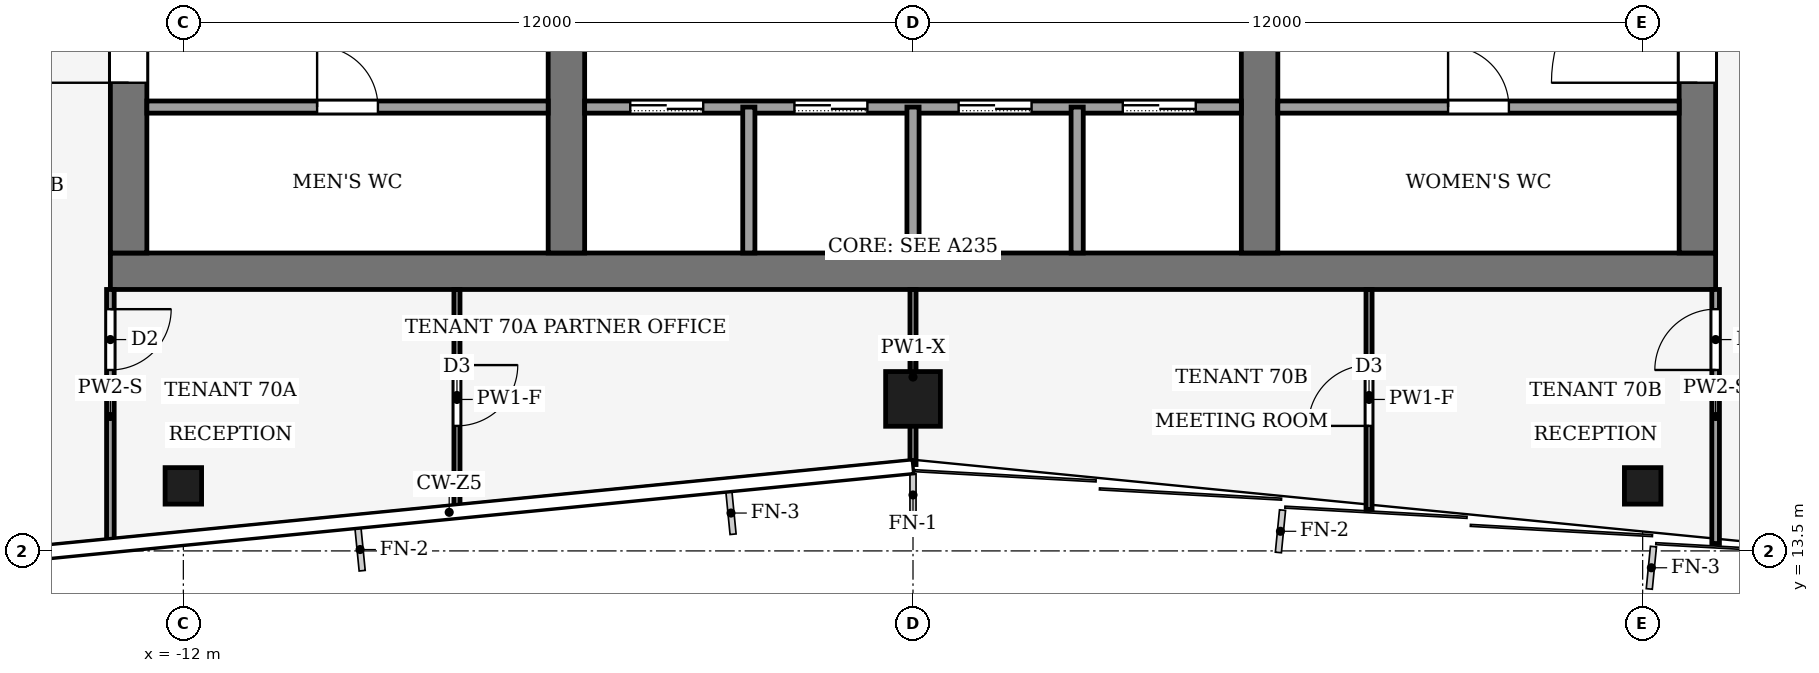
"""IFC4 building model, lengths in metres.
Left out: names, types, materials, properties, quantities, classifications, styles, units other than length and angle.
Written with IfcOpenShell. Run it as: python <this file> out.ifc"""

import sys

from ifc_helpers import new_model, si_unit, direction, frame, frame_2d, origin, origin_2d, place, context, subcontext, project, spatial, rectangle, hollow_rectangle, extrude, element, fill, save


model = new_model("IFC4")
c1 = context("Model", 3, precision=1e-05, world=origin(), true_north=direction((0.0, 1.0)))
c2 = subcontext(c1, "Body", "Model", "MODEL_VIEW")
j1 = project(units=[si_unit("LENGTHUNIT", "METRE"), si_unit("PLANEANGLEUNIT", "RADIAN")], contexts=[c1])
p1 = place(None, origin())
s1 = spatial("IfcSite", under=j1, at=p1, CompositionType="ELEMENT")
p2 = place(p1, origin())
s2 = spatial("IfcBuilding", under=s1, at=p2, CompositionType="ELEMENT")
p3 = place(p2, frame((0.0, 0.0, 306.0)))
s3 = spatial("IfcBuildingStorey", under=s2, at=p3, CompositionType="ELEMENT", Elevation=306.0)
p4 = place(p3, frame((-13.2, 18.1, -0.13), z_axis=(0.0, 0.0, 1.0), x_axis=(1.0, 0.0, 0.0)))
e1 = element("IfcWall", 1, at=p4, inside=s3, PredefinedType="SHEAR", context=c2, shape_type="SweptSolid", body=[
    extrude(rectangle(XDim=26.4, YDim=0.6, at=frame_2d((13.2, 0.0))), origin(), (0.0, 0.0, 1.0), 4.0),
])
p5 = place(p3, frame((-12.9, 18.4, -0.13), z_axis=(0.0, 0.0, 1.0), x_axis=(0.0, 1.0, 0.0)))
e2 = element("IfcWall", 2, at=p5, inside=s3, PredefinedType="SHEAR", context=c2, shape_type="SweptSolid", body=[
    extrude(rectangle(XDim=19.2, YDim=0.6, at=frame_2d((9.6, 0.0))), origin(), (0.0, 0.0, 1.0), 4.0),
])
p6 = place(p5, frame((2.8, 0.0, 0.13)))
e3 = element("IfcOpeningElement", 3, at=p6, cuts=e2, PredefinedType="OPENING", context=c2, shape_type="SweptSolid", body=[
    extrude(rectangle(XDim=2.4, YDim=2.4, at=frame_2d((1.2, 1.2))), frame((0.0, 0.31, 0.0), z_axis=(0.0, -1.0, 0.0), x_axis=(1.0, 0.0, 0.0)), (0.0, 0.0, 1.0), 0.62),
])
p7 = place(p5, frame((13.4, 0.0, 0.13)))
e4 = element("IfcOpeningElement", 4, at=p7, cuts=e2, PredefinedType="OPENING", context=c2, shape_type="SweptSolid", body=[
    extrude(rectangle(XDim=1.4, YDim=2.2, at=frame_2d((0.7, 1.1))), frame((0.0, 0.31, 0.0), z_axis=(0.0, -1.0, 0.0), x_axis=(1.0, 0.0, 0.0)), (0.0, 0.0, 1.0), 0.62),
])
p8 = place(p3, frame((12.9, 18.4, -0.13), z_axis=(0.0, 0.0, 1.0), x_axis=(0.0, 1.0, 0.0)))
e5 = element("IfcWall", 5, at=p8, inside=s3, PredefinedType="SHEAR", context=c2, shape_type="SweptSolid", body=[
    extrude(rectangle(XDim=19.2, YDim=0.6, at=frame_2d((9.6, 0.0))), origin(), (0.0, 0.0, 1.0), 4.0),
])
p9 = place(p8, frame((2.8, 0.0, 0.13)))
e6 = element("IfcOpeningElement", 6, at=p9, cuts=e5, PredefinedType="OPENING", context=c2, shape_type="SweptSolid", body=[
    extrude(rectangle(XDim=2.4, YDim=2.4, at=frame_2d((1.2, 1.2))), frame((0.0, 0.31, 0.0), z_axis=(0.0, -1.0, 0.0), x_axis=(1.0, 0.0, 0.0)), (0.0, 0.0, 1.0), 0.62),
])
p10 = place(p8, frame((13.3, 0.0, 0.13)))
e7 = element("IfcOpeningElement", 7, at=p10, cuts=e5, PredefinedType="OPENING", context=c2, shape_type="SweptSolid", body=[
    extrude(rectangle(XDim=2.4, YDim=2.4, at=frame_2d((1.2, 1.2))), frame((0.0, 0.31, 0.0), z_axis=(0.0, -1.0, 0.0), x_axis=(1.0, 0.0, 0.0)), (0.0, 0.0, 1.0), 0.62),
])
p11 = place(p3, frame((-5.7, 18.4, -0.13), z_axis=(0.0, 0.0, 1.0), x_axis=(0.0, 1.0, 0.0)))
e8 = element("IfcWall", 8, at=p11, inside=s3, PredefinedType="SHEAR", context=c2, shape_type="SweptSolid", body=[
    extrude(rectangle(XDim=19.2, YDim=0.6, at=frame_2d((9.6, 0.0))), origin(), (0.0, 0.0, 1.0), 4.0),
])
p12 = place(p11, frame((8.35, 0.0, 0.13)))
e9 = element("IfcOpeningElement", 9, at=p12, cuts=e8, PredefinedType="OPENING", context=c2, shape_type="SweptSolid", body=[
    extrude(rectangle(XDim=0.9, YDim=2.1, at=frame_2d((0.45, 1.05))), frame((0.0, 0.31, 0.0), z_axis=(0.0, -1.0, 0.0), x_axis=(1.0, 0.0, 0.0)), (0.0, 0.0, 1.0), 0.62),
])
p13 = place(p3, frame((5.7, 18.4, -0.13), z_axis=(0.0, 0.0, 1.0), x_axis=(0.0, 1.0, 0.0)))
e10 = element("IfcWall", 10, at=p13, inside=s3, PredefinedType="SHEAR", context=c2, shape_type="SweptSolid", body=[
    extrude(rectangle(XDim=19.2, YDim=0.6, at=frame_2d((9.6, 0.0))), origin(), (0.0, 0.0, 1.0), 4.0),
])
p14 = place(p13, frame((13.3, 0.0, 0.13)))
e11 = element("IfcOpeningElement", 11, at=p14, cuts=e10, PredefinedType="OPENING", context=c2, shape_type="SweptSolid", body=[
    extrude(rectangle(XDim=2.4, YDim=2.4, at=frame_2d((1.2, 1.2))), frame((0.0, 0.31, 0.0), z_axis=(0.0, -1.0, 0.0), x_axis=(1.0, 0.0, 0.0)), (0.0, 0.0, 1.0), 0.62),
])
p15 = place(p3, frame((0.0, 16.0, 0.0), z_axis=(0.0, 0.0, 1.0), x_axis=(1.0, 0.0, 0.0)))
e12 = element("IfcColumn", 12, at=p15, inside=s3, PredefinedType="COLUMN", context=c2, shape_type="SweptSolid", body=[
    extrude(hollow_rectangle(XDim=0.9, YDim=0.9, WallThickness=0.04, at=origin_2d()), origin(), (0.0, 0.0, 1.0), 4.0),
])
for number, where, z_axis, x_axis in (
    (13, (-12.0, 14.57, 0.0), (0.0, 0.0, 1.0), (1.0, 0.0, 0.0)),
    (14, (12.0, 14.57, 0.0), (0.0, 0.0, 1.0), (1.0, 0.0, 0.0)),
):
    element("IfcColumn", number, at=place(p3, frame(where, z_axis=z_axis, x_axis=x_axis)), inside=s3, PredefinedType="COLUMN", context=c2, shape_type="SweptSolid", body=[
        extrude(hollow_rectangle(XDim=0.6, YDim=0.6, WallThickness=0.025, at=origin_2d()), origin(), (0.0, 0.0, 1.0), 4.0),
    ])
p16 = place(p3, frame((-12.6, 20.8, 0.0), z_axis=(0.0, 0.0, 1.0), x_axis=(1.0, 0.0, 0.0)))
e15 = element("IfcWall", 15, at=p16, inside=s3, PredefinedType="PARTITIONING", context=c2, shape_type="SweptSolid", body=[
    extrude(rectangle(XDim=6.6, YDim=0.2, at=frame_2d((3.3, 0.0))), origin(), (0.0, 0.0, 1.0), 3.87),
])
p17 = place(p16, frame((2.8, 0.0, 0.0)))
e16 = element("IfcOpeningElement", 16, at=p17, cuts=e15, PredefinedType="OPENING", context=c2, shape_type="SweptSolid", body=[
    extrude(rectangle(XDim=1.0, YDim=2.1, at=frame_2d((0.5, 1.05))), frame((0.0, 0.11, 0.0), z_axis=(0.0, -1.0, 0.0), x_axis=(1.0, 0.0, 0.0)), (0.0, 0.0, 1.0), 0.22),
])
p18 = place(p3, frame((-5.4, 20.8, 0.0), z_axis=(0.0, 0.0, 1.0), x_axis=(1.0, 0.0, 0.0)))
e17 = element("IfcWall", 17, at=p18, inside=s3, PredefinedType="PARTITIONING", context=c2, shape_type="SweptSolid", body=[
    extrude(rectangle(XDim=10.8, YDim=0.2, at=frame_2d((5.4, 0.0))), origin(), (0.0, 0.0, 1.0), 3.87),
])
p19 = place(p18, frame((0.75, 0.0, 0.0)))
e18 = element("IfcOpeningElement", 18, at=p19, cuts=e17, PredefinedType="OPENING", context=c2, shape_type="SweptSolid", body=[
    extrude(rectangle(XDim=1.2, YDim=2.2, at=frame_2d((0.6, 1.1))), frame((0.0, 0.11, 0.0), z_axis=(0.0, -1.0, 0.0), x_axis=(1.0, 0.0, 0.0)), (0.0, 0.0, 1.0), 0.22),
])
p20 = place(p18, frame((3.45, 0.0, 0.0)))
e19 = element("IfcOpeningElement", 19, at=p20, cuts=e17, PredefinedType="OPENING", context=c2, shape_type="SweptSolid", body=[
    extrude(rectangle(XDim=1.2, YDim=2.2, at=frame_2d((0.6, 1.1))), frame((0.0, 0.11, 0.0), z_axis=(0.0, -1.0, 0.0), x_axis=(1.0, 0.0, 0.0)), (0.0, 0.0, 1.0), 0.22),
])
p21 = place(p18, frame((6.15, 0.0, 0.0)))
e20 = element("IfcOpeningElement", 20, at=p21, cuts=e17, PredefinedType="OPENING", context=c2, shape_type="SweptSolid", body=[
    extrude(rectangle(XDim=1.2, YDim=2.2, at=frame_2d((0.6, 1.1))), frame((0.0, 0.11, 0.0), z_axis=(0.0, -1.0, 0.0), x_axis=(1.0, 0.0, 0.0)), (0.0, 0.0, 1.0), 0.22),
])
p22 = place(p18, frame((8.85, 0.0, 0.0)))
e21 = element("IfcOpeningElement", 21, at=p22, cuts=e17, PredefinedType="OPENING", context=c2, shape_type="SweptSolid", body=[
    extrude(rectangle(XDim=1.2, YDim=2.2, at=frame_2d((0.6, 1.1))), frame((0.0, 0.11, 0.0), z_axis=(0.0, -1.0, 0.0), x_axis=(1.0, 0.0, 0.0)), (0.0, 0.0, 1.0), 0.22),
])
p23 = place(p3, frame((6.0, 20.8, 0.0), z_axis=(0.0, 0.0, 1.0), x_axis=(1.0, 0.0, 0.0)))
e22 = element("IfcWall", 22, at=p23, inside=s3, PredefinedType="PARTITIONING", context=c2, shape_type="SweptSolid", body=[
    extrude(rectangle(XDim=6.6, YDim=0.2, at=frame_2d((3.3, 0.0))), origin(), (0.0, 0.0, 1.0), 3.87),
])
p24 = place(p23, frame((2.8, 0.0, 0.0)))
e23 = element("IfcOpeningElement", 23, at=p24, cuts=e22, PredefinedType="OPENING", context=c2, shape_type="SweptSolid", body=[
    extrude(rectangle(XDim=1.0, YDim=2.1, at=frame_2d((0.5, 1.05))), frame((0.0, 0.11, 0.0), z_axis=(0.0, -1.0, 0.0), x_axis=(1.0, 0.0, 0.0)), (0.0, 0.0, 1.0), 0.22),
])
for number, where, z_axis, x_axis in (
    (24, (-2.7, 18.4, 0.0), (0.0, 0.0, 1.0), (0.0, 1.0, 0.0)),
    (25, (0.0, 18.4, 0.0), (0.0, 0.0, 1.0), (0.0, 1.0, 0.0)),
    (26, (2.7, 18.4, 0.0), (0.0, 0.0, 1.0), (0.0, 1.0, 0.0)),
):
    element("IfcWall", number, at=place(p3, frame(where, z_axis=z_axis, x_axis=x_axis)), inside=s3, PredefinedType="PARTITIONING", context=c2, shape_type="SweptSolid", body=[
        extrude(rectangle(XDim=2.4, YDim=0.2, at=frame_2d((1.2, 0.0))), origin(), (0.0, 0.0, 1.0), 3.87),
    ])
p25 = place(p3, frame((-13.2, 17.8, 0.0), z_axis=(0.0, 0.0, 1.0), x_axis=(0.0, -1.0, 0.0)))
e27 = element("IfcWall", 27, at=p25, inside=s3, PredefinedType="PARTITIONING", context=c2, shape_type="SweptSolid", body=[
    extrude(rectangle(XDim=4.178, YDim=0.125, at=frame_2d((2.089, 0.0))), origin(), (0.0, 0.0, 1.0), 3.04),
])
p26 = place(p25, frame((0.324, 0.0, 0.0)))
e28 = element("IfcOpeningElement", 28, at=p26, cuts=e27, PredefinedType="OPENING", context=c2, shape_type="SweptSolid", body=[
    extrude(rectangle(XDim=1.0, YDim=2.1, at=frame_2d((0.5, 1.05))), frame((0.0, 0.073, 0.0), z_axis=(0.0, -1.0, 0.0), x_axis=(1.0, 0.0, 0.0)), (0.0, 0.0, 1.0), 0.145),
])
p27 = place(p3, frame((13.2, 13.622, 0.0), z_axis=(0.0, 0.0, 1.0), x_axis=(0.0, 1.0, 0.0)))
e29 = element("IfcWall", 29, at=p27, inside=s3, PredefinedType="PARTITIONING", context=c2, shape_type="SweptSolid", body=[
    extrude(rectangle(XDim=4.178, YDim=0.125, at=frame_2d((2.089, 0.0))), origin(), (0.0, 0.0, 1.0), 3.04),
])
p28 = place(p27, frame((2.854, 0.0, 0.0)))
e30 = element("IfcOpeningElement", 30, at=p28, cuts=e29, PredefinedType="OPENING", context=c2, shape_type="SweptSolid", body=[
    extrude(rectangle(XDim=1.0, YDim=2.1, at=frame_2d((0.5, 1.05))), frame((0.0, 0.073, 0.0), z_axis=(0.0, -1.0, 0.0), x_axis=(1.0, 0.0, 0.0)), (0.0, 0.0, 1.0), 0.145),
])
p29 = place(p3, frame((-7.5, 17.8, 0.0), z_axis=(0.0, 0.0, 1.0), x_axis=(0.0, -1.0, 0.0)))
e31 = element("IfcWall", 31, at=p29, inside=s3, PredefinedType="PARTITIONING", context=c2, shape_type="SweptSolid", body=[
    extrude(rectangle(XDim=3.618, YDim=0.1, at=frame_2d((1.809, 0.0))), origin(), (0.0, 0.0, 1.0), 3.04),
])
p30 = place(p29, frame((1.244, 0.0, 0.0)))
e32 = element("IfcOpeningElement", 32, at=p30, cuts=e31, PredefinedType="OPENING", context=c2, shape_type="SweptSolid", body=[
    extrude(rectangle(XDim=1.0, YDim=2.1, at=frame_2d((0.5, 1.05))), frame((0.0, 0.06, 0.0), z_axis=(0.0, -1.0, 0.0), x_axis=(1.0, 0.0, 0.0)), (0.0, 0.0, 1.0), 0.12),
])
p31 = place(p3, frame((0.0, 14.92, 0.0), z_axis=(0.0, 0.0, 1.0), x_axis=(0.0, 1.0, 0.0)))
e33 = element("IfcWall", 33, at=p31, inside=s3, PredefinedType="PARTITIONING", context=c2, shape_type="SweptSolid", body=[
    extrude(rectangle(XDim=2.88, YDim=0.1, at=frame_2d((1.44, 0.0))), origin(), (0.0, 0.0, 1.0), 3.54),
])
p32 = place(p3, frame((7.5, 14.182, 0.0), z_axis=(0.0, 0.0, 1.0), x_axis=(0.0, 1.0, 0.0)))
e34 = element("IfcWall", 34, at=p32, inside=s3, PredefinedType="PARTITIONING", context=c2, shape_type="SweptSolid", body=[
    extrude(rectangle(XDim=3.618, YDim=0.1, at=frame_2d((1.809, 0.0))), origin(), (0.0, 0.0, 1.0), 3.04),
])
p33 = place(p32, frame((1.374, 0.0, 0.0)))
e35 = element("IfcOpeningElement", 35, at=p33, cuts=e34, PredefinedType="OPENING", context=c2, shape_type="SweptSolid", body=[
    extrude(rectangle(XDim=1.0, YDim=2.1, at=frame_2d((0.5, 1.05))), frame((0.0, 0.06, 0.0), z_axis=(0.0, -1.0, 0.0), x_axis=(1.0, 0.0, 0.0)), (0.0, 0.0, 1.0), 0.12),
])
p34 = place(p19, origin())
e36 = element("IfcDoor", 36, at=p34, inside=s3, OperationType="SLIDING_TO_LEFT", PredefinedType="DOOR", context=c2, shape_type="SweptSolid", body=[
    extrude(rectangle(XDim=1.2, YDim=2.2, at=frame_2d((0.6, 1.1))), frame((0.0, 0.025, 0.0), z_axis=(0.0, -1.0, 0.0), x_axis=(1.0, 0.0, 0.0)), (0.0, 0.0, 1.0), 0.05),
])
fill(e18, e36)
p35 = place(p20, origin())
e37 = element("IfcDoor", 37, at=p35, inside=s3, OperationType="SLIDING_TO_LEFT", PredefinedType="DOOR", context=c2, shape_type="SweptSolid", body=[
    extrude(rectangle(XDim=1.2, YDim=2.2, at=frame_2d((0.6, 1.1))), frame((0.0, 0.025, 0.0), z_axis=(0.0, -1.0, 0.0), x_axis=(1.0, 0.0, 0.0)), (0.0, 0.0, 1.0), 0.05),
])
fill(e19, e37)
p36 = place(p21, origin())
e38 = element("IfcDoor", 38, at=p36, inside=s3, OperationType="SLIDING_TO_LEFT", PredefinedType="DOOR", context=c2, shape_type="SweptSolid", body=[
    extrude(rectangle(XDim=1.2, YDim=2.2, at=frame_2d((0.6, 1.1))), frame((0.0, 0.025, 0.0), z_axis=(0.0, -1.0, 0.0), x_axis=(1.0, 0.0, 0.0)), (0.0, 0.0, 1.0), 0.05),
])
fill(e20, e38)
p37 = place(p22, origin())
e39 = element("IfcDoor", 39, at=p37, inside=s3, OperationType="SLIDING_TO_LEFT", PredefinedType="DOOR", context=c2, shape_type="SweptSolid", body=[
    extrude(rectangle(XDim=1.2, YDim=2.2, at=frame_2d((0.6, 1.1))), frame((0.0, 0.025, 0.0), z_axis=(0.0, -1.0, 0.0), x_axis=(1.0, 0.0, 0.0)), (0.0, 0.0, 1.0), 0.05),
])
fill(e21, e39)
p38 = place(p17, origin())
e40 = element("IfcDoor", 40, at=p38, inside=s3, OperationType="SINGLE_SWING_LEFT", PredefinedType="DOOR", context=c2, shape_type="SweptSolid", body=[
    extrude(rectangle(XDim=1.0, YDim=2.1, at=frame_2d((0.5, 1.05))), frame((0.0, 0.025, 0.0), z_axis=(0.0, -1.0, 0.0), x_axis=(1.0, 0.0, 0.0)), (0.0, 0.0, 1.0), 0.05),
])
fill(e16, e40)
p39 = place(p24, origin())
e41 = element("IfcDoor", 41, at=p39, inside=s3, OperationType="SINGLE_SWING_RIGHT", PredefinedType="DOOR", context=c2, shape_type="SweptSolid", body=[
    extrude(rectangle(XDim=1.0, YDim=2.1, at=frame_2d((0.5, 1.05))), frame((0.0, 0.025, 0.0), z_axis=(0.0, -1.0, 0.0), x_axis=(1.0, 0.0, 0.0)), (0.0, 0.0, 1.0), 0.05),
])
fill(e23, e41)
p40 = place(p6, origin())
e42 = element("IfcDoor", 42, at=p40, inside=s3, OperationType="DOUBLE_DOOR_SINGLE_SWING", PredefinedType="DOOR", context=c2, shape_type="SweptSolid", body=[
    extrude(rectangle(XDim=2.4, YDim=2.4, at=frame_2d((1.2, 1.2))), frame((0.0, 0.025, 0.0), z_axis=(0.0, -1.0, 0.0), x_axis=(1.0, 0.0, 0.0)), (0.0, 0.0, 1.0), 0.05),
])
fill(e3, e42)
p41 = place(p9, origin())
e43 = element("IfcDoor", 43, at=p41, inside=s3, OperationType="DOUBLE_DOOR_SINGLE_SWING", PredefinedType="DOOR", context=c2, shape_type="SweptSolid", body=[
    extrude(rectangle(XDim=2.4, YDim=2.4, at=frame_2d((1.2, 1.2))), frame((0.0, 0.025, 0.0), z_axis=(0.0, -1.0, 0.0), x_axis=(1.0, 0.0, 0.0)), (0.0, 0.0, 1.0), 0.05),
])
fill(e6, e43)
p42 = place(p26, origin())
e44 = element("IfcDoor", 44, at=p42, inside=s3, OperationType="SINGLE_SWING_LEFT", PredefinedType="DOOR", context=c2, shape_type="SweptSolid", body=[
    extrude(rectangle(XDim=1.0, YDim=2.1, at=frame_2d((0.5, 1.05))), frame((0.0, 0.025, 0.0), z_axis=(0.0, -1.0, 0.0), x_axis=(1.0, 0.0, 0.0)), (0.0, 0.0, 1.0), 0.05),
])
fill(e28, e44)
p43 = place(p28, origin())
e45 = element("IfcDoor", 45, at=p43, inside=s3, OperationType="SINGLE_SWING_RIGHT", PredefinedType="DOOR", context=c2, shape_type="SweptSolid", body=[
    extrude(rectangle(XDim=1.0, YDim=2.1, at=frame_2d((0.5, 1.05))), frame((0.0, 0.025, 0.0), z_axis=(0.0, -1.0, 0.0), x_axis=(1.0, 0.0, 0.0)), (0.0, 0.0, 1.0), 0.05),
])
fill(e30, e45)
p44 = place(p30, origin())
e46 = element("IfcDoor", 46, at=p44, inside=s3, OperationType="SINGLE_SWING_LEFT", PredefinedType="DOOR", context=c2, shape_type="SweptSolid", body=[
    extrude(rectangle(XDim=1.0, YDim=2.1, at=frame_2d((0.5, 1.05))), frame((0.0, 0.025, 0.0), z_axis=(0.0, -1.0, 0.0), x_axis=(1.0, 0.0, 0.0)), (0.0, 0.0, 1.0), 0.05),
])
fill(e32, e46)
p45 = place(p33, origin())
e47 = element("IfcDoor", 47, at=p45, inside=s3, OperationType="SINGLE_SWING_RIGHT", PredefinedType="DOOR", context=c2, shape_type="SweptSolid", body=[
    extrude(rectangle(XDim=1.0, YDim=2.1, at=frame_2d((0.5, 1.05))), frame((0.0, 0.025, 0.0), z_axis=(0.0, -1.0, 0.0), x_axis=(1.0, 0.0, 0.0)), (0.0, 0.0, 1.0), 0.05),
])
fill(e35, e47)
save(model, sys.argv[1])
